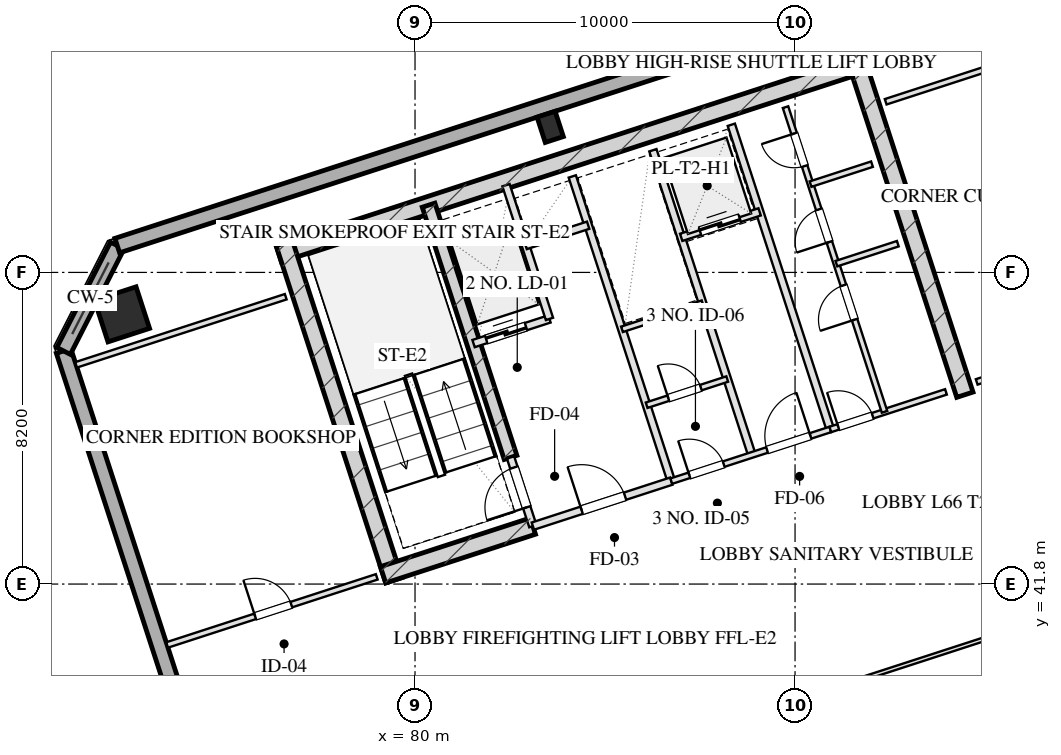
"""IFC4 building model, lengths in metres.
Left out: names, types, materials, properties, quantities, classifications, styles, units other than length and angle.
Written with IfcOpenShell. Run it as: python <this file> out.ifc"""

import sys

from ifc_helpers import new_model, si_unit, direction, frame, frame_2d, origin, origin_2d, place, context, subcontext, project, spatial, rectangle, hollow_rectangle, extrude, element, fill, save


model = new_model("IFC4")
c1 = context("Model", 3, precision=1e-05, world=origin(), true_north=direction((0.0, 1.0)))
c2 = subcontext(c1, "Body", "Model", "MODEL_VIEW")
j1 = project(units=[si_unit("LENGTHUNIT", "METRE"), si_unit("PLANEANGLEUNIT", "RADIAN")], contexts=[c1])
p1 = place(None, origin())
s1 = spatial("IfcSite", under=j1, at=p1, CompositionType="ELEMENT")
p2 = place(p1, origin())
s2 = spatial("IfcBuilding", under=s1, at=p2, CompositionType="ELEMENT")
p3 = place(p2, frame((0.0, 0.0, 244.0)))
s3 = spatial("IfcBuildingStorey", under=s2, at=p3, CompositionType="ELEMENT", Elevation=244.0)
p4 = place(p3, frame((76.415, 50.489, 0.0), z_axis=(0.0, 0.0, 1.0), x_axis=(0.951056810414, 0.309016089169, 0.0)))
e1 = element("IfcWall", 1, at=p4, inside=s3, PredefinedType="SHEAR", context=c2, shape_type="SweptSolid", body=[
    extrude(rectangle(XDim=16.25, YDim=0.45, at=frame_2d((8.125, 0.0))), origin(), (0.0, 0.0, 1.0), 3.2),
])
for number, where, z_axis, x_axis in (
    (2, (79.442, 41.899, 0.0), (0.0, 0.0, 1.0), (-0.309, 0.951, 0.0)),
    (3, (94.469, 46.781, 0.0), (0.0, 0.0, 1.0), (-0.309, 0.951, 0.0)),
):
    element("IfcWall", number, at=place(p3, frame(where, z_axis=z_axis, x_axis=x_axis)), inside=s3, PredefinedType="SHEAR", context=c2, shape_type="SweptSolid", body=[
        extrude(rectangle(XDim=9.33, YDim=0.45, at=frame_2d((4.665, 0.0))), origin(), (0.0, 0.0, 1.0), 3.2),
    ])
p5 = place(p3, frame((82.514, 45.131, 0.0), z_axis=(0.0, 0.0, 1.0), x_axis=(-0.308988790936, 0.951065679686, 0.0)))
e4 = element("IfcWall", 4, at=p5, inside=s3, PredefinedType="SHEAR", context=c2, shape_type="SweptSolid", body=[
    extrude(rectangle(XDim=6.98, YDim=0.35, at=frame_2d((3.49, 0.0))), origin(), (0.0, 0.0, 1.0), 3.2),
])
p6 = place(p3, frame((79.159, 42.043, 0.0), z_axis=(0.0, 0.0, 1.0), x_axis=(0.951047485828, 0.309044785913, 0.0)))
e5 = element("IfcWall", 5, at=p6, inside=s3, PredefinedType="SHEAR", context=c2, shape_type="SweptSolid", body=[
    extrude(rectangle(XDim=4.145, YDim=0.45, at=frame_2d((2.073, 0.0))), origin(), (0.0, 0.0, 1.0), 3.2),
])
for number, where, z_axis, x_axis in (
    (6, (95.572, 56.461, 0.0), (0.0, 0.0, 1.0), (0.951, 0.309, 0.0)),
    (7, (72.29, 48.896, 0.0), (0.0, 0.0, 1.0), (0.951, 0.309, 0.0)),
):
    element("IfcColumn", number, at=place(p3, frame(where, z_axis=z_axis, x_axis=x_axis)), inside=s3, PredefinedType="COLUMN", context=c2, shape_type="SweptSolid", body=[
        extrude(hollow_rectangle(XDim=1.15, YDim=1.15, WallThickness=0.04, at=origin_2d()), origin(), (0.0, 0.0, 1.0), 3.201),
    ])
p7 = place(p3, frame((83.557, 53.83, 0.0), z_axis=(0.0, 0.0, 1.0), x_axis=(0.951056516295, 0.309016994375, 0.0)))
e8 = element("IfcColumn", 8, at=p7, inside=s3, PredefinedType="COLUMN", context=c2, shape_type="SweptSolid", body=[
    extrude(hollow_rectangle(XDim=0.5, YDim=0.7, WallThickness=0.025, at=origin_2d()), origin(), (0.0, 0.0, 1.0), 3.201),
])
p8 = place(p3, frame((82.618, 11.414, 0.0), z_axis=(0.0, 0.0, 1.0), x_axis=(-0.309016491071, 0.951056679828, 0.0)))
e9 = element("IfcWall", 9, at=p8, inside=s3, PredefinedType="SOLIDWALL", context=c2, shape_type="SweptSolid", body=[
    extrude(rectangle(XDim=38.4, YDim=0.4, at=frame_2d((19.2, 0.0))), origin(), (0.0, 0.0, 1.0), 2.36),
])
p9 = place(p8, frame((11.825, 0.0, 0.75)))
e10 = element("IfcOpeningElement", 10, at=p9, cuts=e9, PredefinedType="OPENING", context=c2, shape_type="SweptSolid", body=[
    extrude(rectangle(XDim=1.95, YDim=1.21, at=frame_2d((0.975, 0.605))), frame((0.0, 0.21, 0.0), z_axis=(0.0, -1.0, 0.0), x_axis=(1.0, 0.0, 0.0)), (0.0, 0.0, 1.0), 0.42),
])
p10 = place(p8, frame((15.625, 0.0, 0.75)))
e11 = element("IfcOpeningElement", 11, at=p10, cuts=e9, PredefinedType="OPENING", context=c2, shape_type="SweptSolid", body=[
    extrude(rectangle(XDim=1.95, YDim=1.21, at=frame_2d((0.975, 0.605))), frame((0.0, 0.21, 0.0), z_axis=(0.0, -1.0, 0.0), x_axis=(1.0, 0.0, 0.0)), (0.0, 0.0, 1.0), 0.42),
])
p11 = place(p8, frame((20.825, 0.0, 0.75)))
e12 = element("IfcOpeningElement", 12, at=p11, cuts=e9, PredefinedType="OPENING", context=c2, shape_type="SweptSolid", body=[
    extrude(rectangle(XDim=1.95, YDim=1.21, at=frame_2d((0.975, 0.605))), frame((0.0, 0.21, 0.0), z_axis=(0.0, -1.0, 0.0), x_axis=(1.0, 0.0, 0.0)), (0.0, 0.0, 1.0), 0.42),
])
p12 = place(p8, frame((24.625, 0.0, 0.75)))
e13 = element("IfcOpeningElement", 13, at=p12, cuts=e9, PredefinedType="OPENING", context=c2, shape_type="SweptSolid", body=[
    extrude(rectangle(XDim=1.95, YDim=1.21, at=frame_2d((0.975, 0.605))), frame((0.0, 0.21, 0.0), z_axis=(0.0, -1.0, 0.0), x_axis=(1.0, 0.0, 0.0)), (0.0, 0.0, 1.0), 0.42),
])
p13 = place(p3, frame((70.752, 47.934, 0.0), z_axis=(0.0, 0.0, 1.0), x_axis=(0.453949291228, 0.891027519774, 0.0)))
e14 = element("IfcWall", 14, at=p13, inside=s3, PredefinedType="SOLIDWALL", context=c2, shape_type="SweptSolid", body=[
    extrude(rectangle(XDim=3.111, YDim=0.4, at=frame_2d((1.556, 0.0))), origin(), (0.0, 0.0, 1.0), 2.36),
])
p14 = place(p3, frame((72.165, 50.706, 0.0), z_axis=(0.0, 0.0, 1.0), x_axis=(0.951058012937, 0.309012388148, 0.0)))
e15 = element("IfcWall", 15, at=p14, inside=s3, PredefinedType="SOLIDWALL", context=c2, shape_type="SweptSolid", body=[
    extrude(rectangle(XDim=23.6, YDim=0.4, at=frame_2d((11.8, 0.0))), origin(), (0.0, 0.0, 1.0), 2.36),
])
p15 = place(p3, frame((83.101, 43.324, 0.0), z_axis=(0.0, 0.0, 1.0), x_axis=(-0.309048298632, 0.951046344356, 0.0)))
e16 = element("IfcWall", 16, at=p15, inside=s3, PredefinedType="PARTITIONING", context=c2, shape_type="SweptSolid", body=[
    extrude(rectangle(XDim=1.9, YDim=0.2, at=frame_2d((0.95, 0.0))), origin(), (0.0, 0.0, 1.0), 2.925),
])
p16 = place(p15, frame((0.52, 0.0, 0.0)))
e17 = element("IfcOpeningElement", 17, at=p16, cuts=e16, PredefinedType="OPENING", context=c2, shape_type="SweptSolid", body=[
    extrude(rectangle(XDim=1.1, YDim=2.05, at=frame_2d((0.55, 1.025))), frame((0.0, 0.11, 0.0), z_axis=(0.0, -1.0, 0.0), x_axis=(1.0, 0.0, 0.0)), (0.0, 0.0, 1.0), 0.22),
])
p17 = place(p3, frame((86.743, 44.508, 0.0), z_axis=(0.0, 0.0, 1.0), x_axis=(-0.309016001439, 0.951056838919, 0.0)))
e18 = element("IfcWall", 18, at=p17, inside=s3, PredefinedType="PARTITIONING", context=c2, shape_type="SweptSolid", body=[
    extrude(rectangle(XDim=8.43, YDim=0.2, at=frame_2d((4.215, 0.0))), origin(), (0.0, 0.0, 1.0), 2.925),
])
p18 = place(p3, frame((83.101, 43.324, 0.0), z_axis=(0.0, 0.0, 1.0), x_axis=(0.951052804469, 0.309028417967, 0.0)))
e19 = element("IfcWall", 19, at=p18, inside=s3, PredefinedType="PARTITIONING", context=c2, shape_type="SweptSolid", body=[
    extrude(rectangle(XDim=3.83, YDim=0.2, at=frame_2d((1.915, 0.0))), origin(), (0.0, 0.0, 1.0), 2.925),
])
p19 = place(p18, frame((1.35, 0.0, 0.0)))
e20 = element("IfcOpeningElement", 20, at=p19, cuts=e19, PredefinedType="OPENING", context=c2, shape_type="SweptSolid", body=[
    extrude(rectangle(XDim=1.2, YDim=2.05, at=frame_2d((0.6, 1.025))), frame((0.0, 0.11, 0.0), z_axis=(0.0, -1.0, 0.0), x_axis=(1.0, 0.0, 0.0)), (0.0, 0.0, 1.0), 0.22),
])
p20 = place(p3, frame((81.54, 48.127, 0.0), z_axis=(0.0, 0.0, 1.0), x_axis=(0.951062257173, 0.308999325213, 0.0)))
e21 = element("IfcWall", 21, at=p20, inside=s3, PredefinedType="PARTITIONING", context=c2, shape_type="SweptSolid", body=[
    extrude(rectangle(XDim=2.1, YDim=0.2, at=frame_2d((1.05, 0.0))), origin(), (0.0, 0.0, 1.0), 2.925),
])
p21 = place(p20, frame((0.35, 0.0, 0.0)))
e22 = element("IfcOpeningElement", 22, at=p21, cuts=e21, PredefinedType="OPENING", context=c2, shape_type="SweptSolid", body=[
    extrude(rectangle(XDim=1.1, YDim=2.05, at=frame_2d((0.55, 1.025))), frame((0.0, 0.11, 0.0), z_axis=(0.0, -1.0, 0.0), x_axis=(1.0, 0.0, 0.0)), (0.0, 0.0, 1.0), 0.22),
])
p22 = place(p3, frame((83.538, 48.776, 0.0), z_axis=(0.0, 0.0, 1.0), x_axis=(-0.3089935693, 0.951064127245, 0.0)))
e23 = element("IfcWall", 23, at=p22, inside=s3, PredefinedType="PARTITIONING", context=c2, shape_type="SweptSolid", body=[
    extrude(rectangle(XDim=3.7, YDim=0.2, at=frame_2d((1.85, 0.0))), origin(), (0.0, 0.0, 1.0), 2.925),
])
p23 = place(p3, frame((82.91, 50.707, 0.0), z_axis=(0.0, 0.0, 1.0), x_axis=(0.951041328149, 0.309063734775, 0.0)))
e24 = element("IfcWall", 24, at=p23, inside=s3, PredefinedType="PARTITIONING", context=c2, shape_type="SweptSolid", body=[
    extrude(rectangle(XDim=1.73, YDim=0.2, at=frame_2d((0.865, 0.0))), origin(), (0.0, 0.0, 1.0), 2.925),
])
p24 = place(p3, frame((90.928, 45.868, 0.0), z_axis=(0.0, 0.0, 1.0), x_axis=(-0.309042196757, 0.951048327176, 0.0)))
e25 = element("IfcWall", 25, at=p24, inside=s3, PredefinedType="PARTITIONING", context=c2, shape_type="SweptSolid", body=[
    extrude(rectangle(XDim=8.43, YDim=0.2, at=frame_2d((4.215, 0.0))), origin(), (0.0, 0.0, 1.0), 2.925),
])
p25 = place(p3, frame((88.864, 45.197, 0.0), z_axis=(0.0, 0.0, 1.0), x_axis=(-0.309007490203, 0.951059604335, 0.0)))
e26 = element("IfcWall", 26, at=p25, inside=s3, PredefinedType="PARTITIONING", context=c2, shape_type="SweptSolid", body=[
    extrude(rectangle(XDim=8.43, YDim=0.2, at=frame_2d((4.215, 0.0))), origin(), (0.0, 0.0, 1.0), 2.925),
])
p26 = place(p3, frame((86.743, 44.508, 0.0), z_axis=(0.0, 0.0, 1.0), x_axis=(0.951063829732, 0.308994485023, 0.0)))
e27 = element("IfcWall", 27, at=p26, inside=s3, PredefinedType="PARTITIONING", context=c2, shape_type="SweptSolid", body=[
    extrude(rectangle(XDim=4.4, YDim=0.15, at=frame_2d((2.2, 0.0))), origin(), (0.0, 0.0, 1.0), 2.925),
])
p27 = place(p26, frame((0.5, 0.0, 0.0)))
e28 = element("IfcOpeningElement", 28, at=p27, cuts=e27, PredefinedType="OPENING", context=c2, shape_type="SweptSolid", body=[
    extrude(rectangle(XDim=0.95, YDim=2.05, at=frame_2d((0.475, 1.025))), frame((0.0, 0.085, 0.0), z_axis=(0.0, -1.0, 0.0), x_axis=(1.0, 0.0, 0.0)), (0.0, 0.0, 1.0), 0.17),
])
p28 = place(p26, frame((2.65, 0.0, 0.0)))
e29 = element("IfcOpeningElement", 29, at=p28, cuts=e27, PredefinedType="OPENING", context=c2, shape_type="SweptSolid", body=[
    extrude(rectangle(XDim=1.2, YDim=2.05, at=frame_2d((0.6, 1.025))), frame((0.0, 0.085, 0.0), z_axis=(0.0, -1.0, 0.0), x_axis=(1.0, 0.0, 0.0)), (0.0, 0.0, 1.0), 0.17),
])
p29 = place(p3, frame((85.446, 48.502, 0.0), z_axis=(0.0, 0.0, 1.0), x_axis=(0.951075093106, 0.308959814982, 0.0)))
e30 = element("IfcWall", 30, at=p29, inside=s3, PredefinedType="PARTITIONING", context=c2, shape_type="SweptSolid", body=[
    extrude(rectangle(XDim=2.23, YDim=0.15, at=frame_2d((1.115, 0.0))), origin(), (0.0, 0.0, 1.0), 2.925),
])
p30 = place(p3, frame((86.094, 46.505, 0.0), z_axis=(0.0, 0.0, 1.0), x_axis=(0.951042918244, 0.309058841741, 0.0)))
e31 = element("IfcWall", 31, at=p30, inside=s3, PredefinedType="PARTITIONING", context=c2, shape_type="SweptSolid", body=[
    extrude(rectangle(XDim=2.23, YDim=0.15, at=frame_2d((1.115, 0.0))), origin(), (0.0, 0.0, 1.0), 2.925),
])
p31 = place(p30, frame((0.6, 0.0, 0.0)))
e32 = element("IfcOpeningElement", 32, at=p31, cuts=e31, PredefinedType="OPENING", context=c2, shape_type="SweptSolid", body=[
    extrude(rectangle(XDim=0.9, YDim=2.05, at=frame_2d((0.45, 1.025))), frame((0.0, 0.085, 0.0), z_axis=(0.0, -1.0, 0.0), x_axis=(1.0, 0.0, 0.0)), (0.0, 0.0, 1.0), 0.17),
])
p32 = place(p3, frame((87.004, 50.922, 0.0), z_axis=(0.0, 0.0, 1.0), x_axis=(0.951041509718, 0.309063176055, 0.0)))
e33 = element("IfcWall", 33, at=p32, inside=s3, PredefinedType="PARTITIONING", context=c2, shape_type="SweptSolid", body=[
    extrude(rectangle(XDim=2.17, YDim=0.2, at=frame_2d((1.085, 0.0))), origin(), (0.0, 0.0, 1.0), 2.925),
])
p33 = place(p32, frame((0.52, 0.0, 0.0)))
e34 = element("IfcOpeningElement", 34, at=p33, cuts=e33, PredefinedType="OPENING", context=c2, shape_type="SweptSolid", body=[
    extrude(rectangle(XDim=1.1, YDim=2.05, at=frame_2d((0.55, 1.025))), frame((0.0, 0.11, 0.0), z_axis=(0.0, -1.0, 0.0), x_axis=(1.0, 0.0, 0.0)), (0.0, 0.0, 1.0), 0.22),
])
p34 = place(p3, frame((90.928, 45.868, 0.0), z_axis=(0.0, 0.0, 1.0), x_axis=(0.951059297078, 0.309008435874, 0.0)))
e35 = element("IfcWall", 35, at=p34, inside=s3, PredefinedType="PARTITIONING", context=c2, shape_type="SweptSolid", body=[
    extrude(rectangle(XDim=3.2, YDim=0.15, at=frame_2d((1.6, 0.0))), origin(), (0.0, 0.0, 1.0), 2.925),
])
p35 = place(p34, frame((0.22, 0.0, 0.0)))
e36 = element("IfcOpeningElement", 36, at=p35, cuts=e35, PredefinedType="OPENING", context=c2, shape_type="SweptSolid", body=[
    extrude(rectangle(XDim=0.95, YDim=2.05, at=frame_2d((0.475, 1.025))), frame((0.0, 0.085, 0.0), z_axis=(0.0, -1.0, 0.0), x_axis=(1.0, 0.0, 0.0)), (0.0, 0.0, 1.0), 0.17),
])
p36 = place(p3, frame((92.355, 46.331, 0.0), z_axis=(0.0, 0.0, 1.0), x_axis=(-0.309007490203, 0.951059604335, 0.0)))
e37 = element("IfcWall", 37, at=p36, inside=s3, PredefinedType="PARTITIONING", context=c2, shape_type="SweptSolid", body=[
    extrude(rectangle(XDim=8.43, YDim=0.15, at=frame_2d((4.215, 0.0))), origin(), (0.0, 0.0, 1.0), 2.925),
])
p37 = place(p36, frame((2.55, 0.0, 0.0)))
e38 = element("IfcOpeningElement", 38, at=p37, cuts=e37, PredefinedType="OPENING", context=c2, shape_type="SweptSolid", body=[
    extrude(rectangle(XDim=0.95, YDim=2.05, at=frame_2d((0.475, 1.025))), frame((0.0, 0.085, 0.0), z_axis=(0.0, -1.0, 0.0), x_axis=(1.0, 0.0, 0.0)), (0.0, 0.0, 1.0), 0.17),
])
p38 = place(p36, frame((4.7, 0.0, 0.0)))
e39 = element("IfcOpeningElement", 39, at=p38, cuts=e37, PredefinedType="OPENING", context=c2, shape_type="SweptSolid", body=[
    extrude(rectangle(XDim=0.9, YDim=2.05, at=frame_2d((0.45, 1.025))), frame((0.0, 0.085, 0.0), z_axis=(0.0, -1.0, 0.0), x_axis=(1.0, 0.0, 0.0)), (0.0, 0.0, 1.0), 0.17),
])
p39 = place(p36, frame((6.8, 0.0, 0.0)))
e40 = element("IfcOpeningElement", 40, at=p39, cuts=e37, PredefinedType="OPENING", context=c2, shape_type="SweptSolid", body=[
    extrude(rectangle(XDim=0.9, YDim=2.05, at=frame_2d((0.45, 1.025))), frame((0.0, 0.085, 0.0), z_axis=(0.0, -1.0, 0.0), x_axis=(1.0, 0.0, 0.0)), (0.0, 0.0, 1.0), 0.17),
])
p40 = place(p3, frame((91.088, 50.23, 0.0), z_axis=(0.0, 0.0, 1.0), x_axis=(0.951054116971, 0.309024378638, 0.0)))
e41 = element("IfcWall", 41, at=p40, inside=s3, PredefinedType="PARTITIONING", context=c2, shape_type="SweptSolid", body=[
    extrude(rectangle(XDim=1.7, YDim=0.15, at=frame_2d((0.85, 0.0))), origin(), (0.0, 0.0, 1.0), 2.925),
])
p41 = place(p3, frame((90.408, 52.323, 0.0), z_axis=(0.0, 0.0, 1.0), x_axis=(0.951040401051, 0.309066587596, 0.0)))
e42 = element("IfcWall", 42, at=p41, inside=s3, PredefinedType="PARTITIONING", context=c2, shape_type="SweptSolid", body=[
    extrude(rectangle(XDim=1.7, YDim=0.15, at=frame_2d((0.85, 0.0))), origin(), (0.0, 0.0, 1.0), 2.925),
])
p42 = place(p3, frame((71.081, 47.568, 0.0), z_axis=(0.0, 0.0, 1.0), x_axis=(0.951059431056, 0.309008023519, 0.0)))
e43 = element("IfcWall", 43, at=p42, inside=s3, PredefinedType="PARTITIONING", context=c2, shape_type="SweptSolid", body=[
    extrude(rectangle(XDim=5.8, YDim=0.15, at=frame_2d((2.9, 0.0))), origin(), (0.0, 0.0, 1.0), 2.925),
])
p43 = place(p3, frame((73.476, 40.197, 0.0), z_axis=(0.0, 0.0, 1.0), x_axis=(0.951059431056, 0.309008023519, 0.0)))
e44 = element("IfcWall", 44, at=p43, inside=s3, PredefinedType="PARTITIONING", context=c2, shape_type="SweptSolid", body=[
    extrude(rectangle(XDim=5.8, YDim=0.15, at=frame_2d((2.9, 0.0))), origin(), (0.0, 0.0, 1.0), 2.925),
])
p44 = place(p43, frame((2.436, 0.0, 0.0)))
e45 = element("IfcOpeningElement", 45, at=p44, cuts=e44, PredefinedType="OPENING", context=c2, shape_type="SweptSolid", body=[
    extrude(rectangle(XDim=1.0, YDim=2.05, at=frame_2d((0.5, 1.025))), frame((0.0, 0.085, 0.0), z_axis=(0.0, -1.0, 0.0), x_axis=(1.0, 0.0, 0.0)), (0.0, 0.0, 1.0), 0.17),
])
p45 = place(p3, frame((92.385, 54.49, 0.0), z_axis=(0.0, 0.0, 1.0), x_axis=(0.951055112834, 0.309021313752, 0.0)))
e46 = element("IfcWall", 46, at=p45, inside=s3, PredefinedType="PARTITIONING", context=c2, shape_type="SweptSolid", body=[
    extrude(rectangle(XDim=5.2, YDim=0.15, at=frame_2d((2.6, 0.0))), origin(), (0.0, 0.0, 1.0), 2.925),
])
p46 = place(p3, frame((94.78, 47.119, 0.0), z_axis=(0.0, 0.0, 1.0), x_axis=(0.951055112834, 0.309021313752, 0.0)))
e47 = element("IfcWall", 47, at=p46, inside=s3, PredefinedType="PARTITIONING", context=c2, shape_type="SweptSolid", body=[
    extrude(rectangle(XDim=5.2, YDim=0.15, at=frame_2d((2.6, 0.0))), origin(), (0.0, 0.0, 1.0), 2.925),
])
p47 = place(p46, frame((2.184, 0.0, 0.0)))
e48 = element("IfcOpeningElement", 48, at=p47, cuts=e47, PredefinedType="OPENING", context=c2, shape_type="SweptSolid", body=[
    extrude(rectangle(XDim=0.85, YDim=2.05, at=frame_2d((0.425, 1.025))), frame((0.0, 0.085, 0.0), z_axis=(0.0, -1.0, 0.0), x_axis=(1.0, 0.0, 0.0)), (0.0, 0.0, 1.0), 0.17),
])
p48 = place(p3, frame((91.296, 39.153, 0.0), z_axis=(0.0, 0.0, 1.0), x_axis=(0.951058423821, 0.309011123554, 0.0)))
e49 = element("IfcWall", 49, at=p48, inside=s3, PredefinedType="MOVABLE", context=c2, shape_type="SweptSolid", body=[
    extrude(rectangle(XDim=10.975, YDim=0.1, at=frame_2d((5.487, 0.0))), origin(), (0.0, 0.0, 1.0), 2.925),
])
p49 = place(p16, origin())
e50 = element("IfcDoor", 50, at=p49, inside=s3, OperationType="SINGLE_SWING_LEFT", PredefinedType="DOOR", context=c2, shape_type="SweptSolid", body=[
    extrude(rectangle(XDim=1.1, YDim=2.05, at=frame_2d((0.55, 1.025))), frame((0.0, 0.025, 0.0), z_axis=(0.0, -1.0, 0.0), x_axis=(1.0, 0.0, 0.0)), (0.0, 0.0, 1.0), 0.05),
])
fill(e17, e50)
p50 = place(p19, origin())
e51 = element("IfcDoor", 51, at=p50, inside=s3, OperationType="SINGLE_SWING_LEFT", PredefinedType="DOOR", context=c2, shape_type="SweptSolid", body=[
    extrude(rectangle(XDim=1.2, YDim=2.05, at=frame_2d((0.6, 1.025))), frame((0.0, 0.025, 0.0), z_axis=(0.0, -1.0, 0.0), x_axis=(1.0, 0.0, 0.0)), (0.0, 0.0, 1.0), 0.05),
])
fill(e20, e51)
p51 = place(p21, origin())
e52 = element("IfcDoor", 52, at=p51, inside=s3, OperationType="DOUBLE_DOOR_SLIDING", PredefinedType="DOOR", context=c2, shape_type="SweptSolid", body=[
    extrude(rectangle(XDim=1.1, YDim=2.05, at=frame_2d((0.55, 1.025))), frame((0.0, 0.025, 0.0), z_axis=(0.0, -1.0, 0.0), x_axis=(1.0, 0.0, 0.0)), (0.0, 0.0, 1.0), 0.05),
])
fill(e22, e52)
p52 = place(p27, origin())
e53 = element("IfcDoor", 53, at=p52, inside=s3, OperationType="SINGLE_SWING_LEFT", PredefinedType="DOOR", context=c2, shape_type="SweptSolid", body=[
    extrude(rectangle(XDim=0.95, YDim=2.05, at=frame_2d((0.475, 1.025))), frame((0.0, 0.025, 0.0), z_axis=(0.0, -1.0, 0.0), x_axis=(1.0, 0.0, 0.0)), (0.0, 0.0, 1.0), 0.05),
])
fill(e28, e53)
p53 = place(p28, origin())
e54 = element("IfcDoor", 54, at=p53, inside=s3, OperationType="SINGLE_SWING_RIGHT", PredefinedType="DOOR", context=c2, shape_type="SweptSolid", body=[
    extrude(rectangle(XDim=1.2, YDim=2.05, at=frame_2d((0.6, 1.025))), frame((0.0, 0.025, 0.0), z_axis=(0.0, -1.0, 0.0), x_axis=(1.0, 0.0, 0.0)), (0.0, 0.0, 1.0), 0.05),
])
fill(e29, e54)
p54 = place(p31, origin())
e55 = element("IfcDoor", 55, at=p54, inside=s3, OperationType="SINGLE_SWING_LEFT", PredefinedType="DOOR", context=c2, shape_type="SweptSolid", body=[
    extrude(rectangle(XDim=0.9, YDim=2.05, at=frame_2d((0.45, 1.025))), frame((0.0, 0.025, 0.0), z_axis=(0.0, -1.0, 0.0), x_axis=(1.0, 0.0, 0.0)), (0.0, 0.0, 1.0), 0.05),
])
fill(e32, e55)
p55 = place(p33, origin())
e56 = element("IfcDoor", 56, at=p55, inside=s3, OperationType="DOUBLE_DOOR_SLIDING", PredefinedType="DOOR", context=c2, shape_type="SweptSolid", body=[
    extrude(rectangle(XDim=1.1, YDim=2.05, at=frame_2d((0.55, 1.025))), frame((0.0, 0.025, 0.0), z_axis=(0.0, -1.0, 0.0), x_axis=(1.0, 0.0, 0.0)), (0.0, 0.0, 1.0), 0.05),
])
fill(e34, e56)
p56 = place(p35, origin())
e57 = element("IfcDoor", 57, at=p56, inside=s3, OperationType="SINGLE_SWING_LEFT", PredefinedType="DOOR", context=c2, shape_type="SweptSolid", body=[
    extrude(rectangle(XDim=0.95, YDim=2.05, at=frame_2d((0.475, 1.025))), frame((0.0, 0.025, 0.0), z_axis=(0.0, -1.0, 0.0), x_axis=(1.0, 0.0, 0.0)), (0.0, 0.0, 1.0), 0.05),
])
fill(e36, e57)
p57 = place(p37, origin())
e58 = element("IfcDoor", 58, at=p57, inside=s3, OperationType="SINGLE_SWING_LEFT", PredefinedType="DOOR", context=c2, shape_type="SweptSolid", body=[
    extrude(rectangle(XDim=0.95, YDim=2.05, at=frame_2d((0.475, 1.025))), frame((0.0, 0.025, 0.0), z_axis=(0.0, -1.0, 0.0), x_axis=(1.0, 0.0, 0.0)), (0.0, 0.0, 1.0), 0.05),
])
fill(e38, e58)
p58 = place(p38, origin())
e59 = element("IfcDoor", 59, at=p58, inside=s3, OperationType="SINGLE_SWING_LEFT", PredefinedType="DOOR", context=c2, shape_type="SweptSolid", body=[
    extrude(rectangle(XDim=0.9, YDim=2.05, at=frame_2d((0.45, 1.025))), frame((0.0, 0.025, 0.0), z_axis=(0.0, -1.0, 0.0), x_axis=(1.0, 0.0, 0.0)), (0.0, 0.0, 1.0), 0.05),
])
fill(e39, e59)
p59 = place(p39, origin())
e60 = element("IfcDoor", 60, at=p59, inside=s3, OperationType="SINGLE_SWING_RIGHT", PredefinedType="DOOR", context=c2, shape_type="SweptSolid", body=[
    extrude(rectangle(XDim=0.9, YDim=2.05, at=frame_2d((0.45, 1.025))), frame((0.0, 0.025, 0.0), z_axis=(0.0, -1.0, 0.0), x_axis=(1.0, 0.0, 0.0)), (0.0, 0.0, 1.0), 0.05),
])
fill(e40, e60)
p60 = place(p44, origin())
e61 = element("IfcDoor", 61, at=p60, inside=s3, OperationType="SINGLE_SWING_LEFT", PredefinedType="DOOR", context=c2, shape_type="SweptSolid", body=[
    extrude(rectangle(XDim=1.0, YDim=2.05, at=frame_2d((0.5, 1.025))), frame((0.0, 0.025, 0.0), z_axis=(0.0, -1.0, 0.0), x_axis=(1.0, 0.0, 0.0)), (0.0, 0.0, 1.0), 0.05),
])
fill(e45, e61)
save(model, sys.argv[1])
